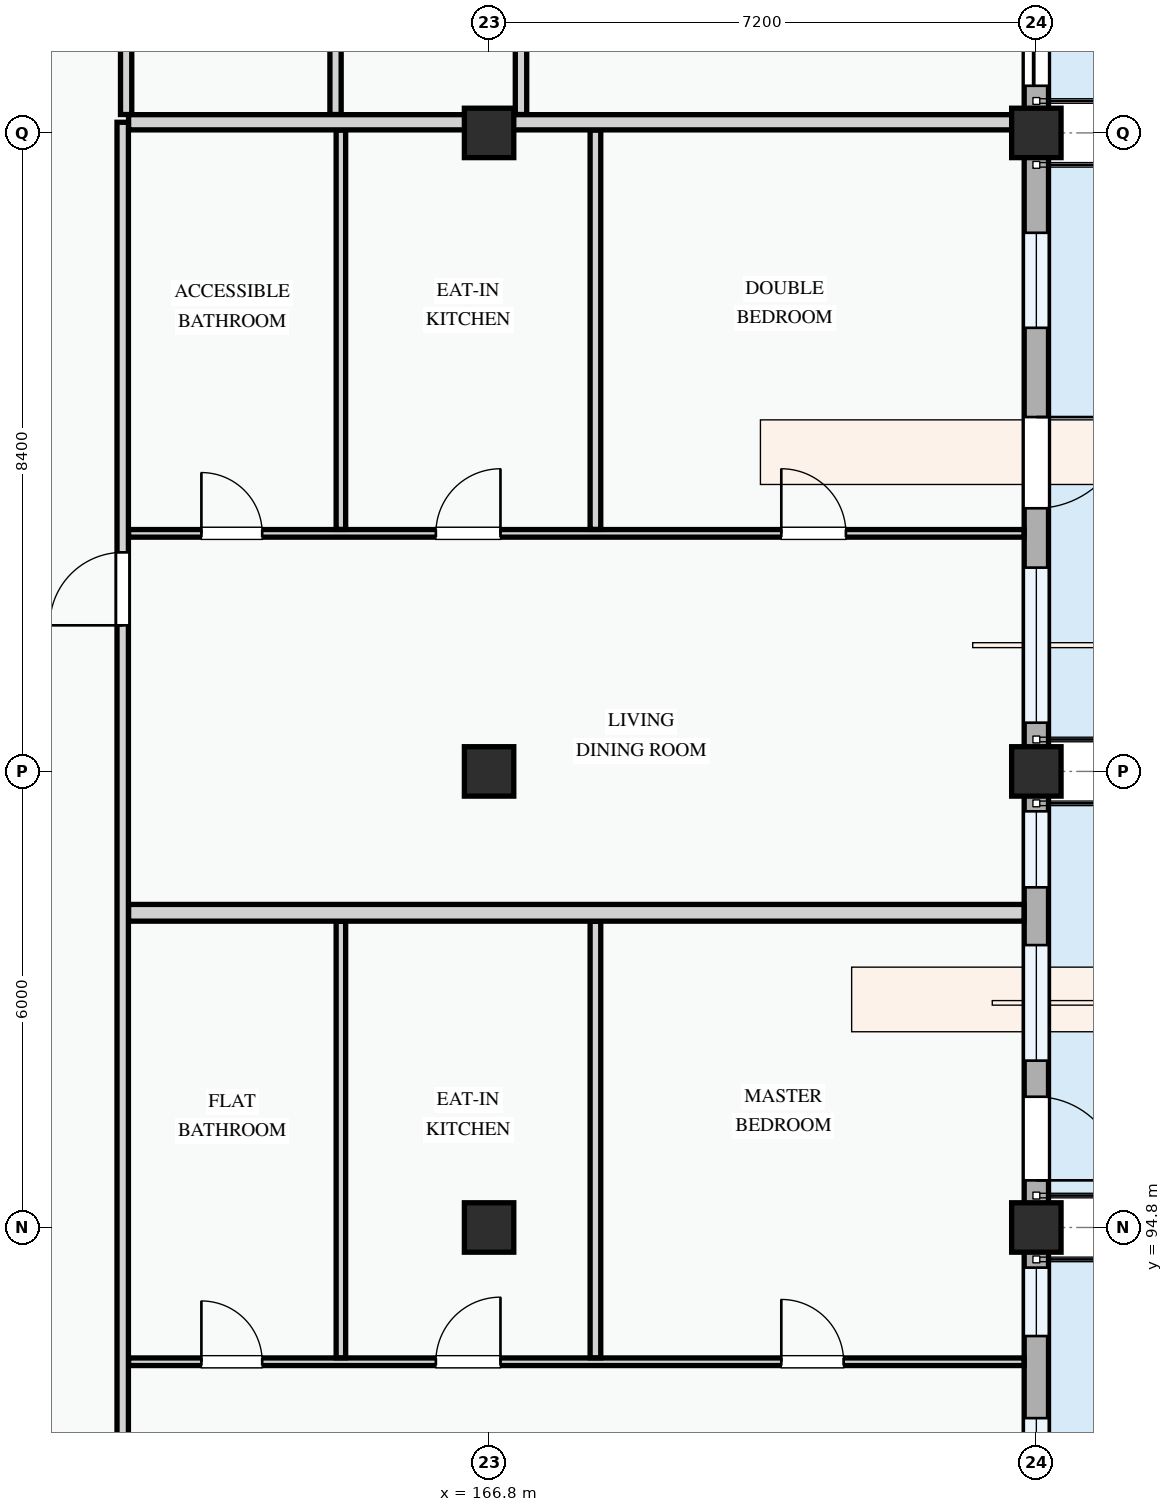
"""IFC4 building model, lengths in metres.
Left out: names, types, materials, properties, quantities, classifications, styles, units other than length and angle.
Written with IfcOpenShell. Run it as: python <this file> out.ifc"""

import sys

from ifc_helpers import new_model, si_unit, direction, frame, frame_2d, origin, origin_2d, place, context, subcontext, project, spatial, rectangle, extrude, element, fill, save


model = new_model("IFC4")
c1 = context("Model", 3, precision=1e-05, world=origin(), true_north=direction((0.0, 1.0)))
c2 = subcontext(c1, "Body", "Model", "MODEL_VIEW")
j1 = project(units=[si_unit("LENGTHUNIT", "METRE"), si_unit("PLANEANGLEUNIT", "RADIAN")], contexts=[c1])
p1 = place(None, origin())
s1 = spatial("IfcSite", under=j1, at=p1, CompositionType="ELEMENT")
p2 = place(p1, origin())
s2 = spatial("IfcBuilding", under=s1, at=p2, CompositionType="ELEMENT")
p3 = place(p2, frame((0.0, 0.0, 18.0)))
s3 = spatial("IfcBuildingStorey", under=s2, at=p3, CompositionType="ELEMENT", Elevation=18.0)
for number, where, z_axis, x_axis in (
    (1, (166.8, 94.8, 0.0), (0.0, 0.0, 1.0), (1.0, 0.0, 0.0)),
    (2, (166.8, 100.8, 0.0), (0.0, 0.0, 1.0), (1.0, 0.0, 0.0)),
    (3, (166.8, 109.2, 0.0), (0.0, 0.0, 1.0), (1.0, 0.0, 0.0)),
    (4, (174.0, 94.8, 0.0), (0.0, 0.0, 1.0), (1.0, 0.0, 0.0)),
    (5, (174.0, 100.8, 0.0), (0.0, 0.0, 1.0), (1.0, 0.0, 0.0)),
    (6, (174.0, 109.2, 0.0), (0.0, 0.0, 1.0), (1.0, 0.0, 0.0)),
):
    element("IfcColumn", number, at=place(p3, frame(where, z_axis=z_axis, x_axis=x_axis)), inside=s3, PredefinedType="COLUMN", context=c2, shape_type="SweptSolid", body=[
        extrude(rectangle(XDim=0.65, YDim=0.65, at=origin_2d()), origin(), (0.0, 0.0, 1.0), 3.3),
    ])
p4 = place(p3, frame((174.0, 109.2, 0.0), z_axis=(0.0, 0.0, 1.0), x_axis=(0.0, 1.0, 0.0)))
e7 = element("IfcWall", 7, at=p4, inside=s3, PredefinedType="STANDARD", context=c2, shape_type="SweptSolid", body=[
    extrude(rectangle(XDim=6.0, YDim=0.32, at=frame_2d((3.0, 0.0))), origin(), (0.0, 0.0, 1.0), 2.575),
])
p5 = place(p4, frame((0.62, 0.0, 0.0)))
e8 = element("IfcOpeningElement", 8, at=p5, cuts=e7, PredefinedType="OPENING", context=c2, shape_type="SweptSolid", body=[
    extrude(rectangle(XDim=1.4, YDim=2.2, at=frame_2d((0.7, 1.1))), frame((0.0, 0.17, 0.0), z_axis=(0.0, -1.0, 0.0), x_axis=(1.0, 0.0, 0.0)), (0.0, 0.0, 1.0), 0.34),
])
p6 = place(p4, frame((2.765, 0.0, 0.78)))
e9 = element("IfcOpeningElement", 9, at=p6, cuts=e7, PredefinedType="OPENING", context=c2, shape_type="SweptSolid", body=[
    extrude(rectangle(XDim=2.35, YDim=1.55, at=frame_2d((1.175, 0.775))), frame((0.0, 0.17, 0.0), z_axis=(0.0, -1.0, 0.0), x_axis=(1.0, 0.0, 0.0)), (0.0, 0.0, 1.0), 0.34),
])
p7 = place(p3, frame((174.0, 86.4, 0.0), z_axis=(0.0, 0.0, 1.0), x_axis=(0.0, 1.0, 0.0)))
e10 = element("IfcWall", 10, at=p7, inside=s3, PredefinedType="STANDARD", context=c2, shape_type="SweptSolid", body=[
    extrude(rectangle(XDim=8.4, YDim=0.32, at=frame_2d((4.2, 0.0))), origin(), (0.0, 0.0, 1.0), 2.425),
])
p8 = place(p7, frame((3.05, 0.0, 0.0)))
e11 = element("IfcOpeningElement", 11, at=p8, cuts=e10, PredefinedType="OPENING", context=c2, shape_type="SweptSolid", body=[
    extrude(rectangle(XDim=1.05, YDim=2.15, at=frame_2d((0.525, 1.075))), frame((0.0, 0.17, 0.0), z_axis=(0.0, -1.0, 0.0), x_axis=(1.0, 0.0, 0.0)), (0.0, 0.0, 1.0), 0.34),
])
p9 = place(p7, frame((0.805, 0.0, 0.78)))
e12 = element("IfcOpeningElement", 12, at=p9, cuts=e10, PredefinedType="OPENING", context=c2, shape_type="SweptSolid", body=[
    extrude(rectangle(XDim=1.3, YDim=1.4, at=frame_2d((0.65, 0.7))), frame((0.0, 0.17, 0.0), z_axis=(0.0, -1.0, 0.0), x_axis=(1.0, 0.0, 0.0)), (0.0, 0.0, 1.0), 0.34),
])
p10 = place(p7, frame((4.892, 0.0, 0.78)))
e13 = element("IfcOpeningElement", 13, at=p10, cuts=e10, PredefinedType="OPENING", context=c2, shape_type="SweptSolid", body=[
    extrude(rectangle(XDim=1.0, YDim=1.25, at=frame_2d((0.5, 0.625))), frame((0.0, 0.17, 0.0), z_axis=(0.0, -1.0, 0.0), x_axis=(1.0, 0.0, 0.0)), (0.0, 0.0, 1.0), 0.34),
])
p11 = place(p7, frame((6.972, 0.0, 0.78)))
e14 = element("IfcOpeningElement", 14, at=p11, cuts=e10, PredefinedType="OPENING", context=c2, shape_type="SweptSolid", body=[
    extrude(rectangle(XDim=0.9, YDim=1.2, at=frame_2d((0.45, 0.6))), frame((0.0, 0.17, 0.0), z_axis=(0.0, -1.0, 0.0), x_axis=(1.0, 0.0, 0.0)), (0.0, 0.0, 1.0), 0.34),
])
p12 = place(p3, frame((174.0, 94.8, 0.0), z_axis=(0.0, 0.0, 1.0), x_axis=(0.0, 1.0, 0.0)))
e15 = element("IfcWall", 15, at=p12, inside=s3, PredefinedType="STANDARD", context=c2, shape_type="SweptSolid", body=[
    extrude(rectangle(XDim=6.0, YDim=0.32, at=frame_2d((3.0, 0.0))), origin(), (0.0, 0.0, 1.0), 2.575),
])
p13 = place(p12, frame((0.62, 0.0, 0.0)))
e16 = element("IfcOpeningElement", 16, at=p13, cuts=e15, PredefinedType="OPENING", context=c2, shape_type="SweptSolid", body=[
    extrude(rectangle(XDim=1.1, YDim=2.15, at=frame_2d((0.55, 1.075))), frame((0.0, 0.17, 0.0), z_axis=(0.0, -1.0, 0.0), x_axis=(1.0, 0.0, 0.0)), (0.0, 0.0, 1.0), 0.34),
])
p14 = place(p12, frame((2.195, 0.0, 0.78)))
e17 = element("IfcOpeningElement", 17, at=p14, cuts=e15, PredefinedType="OPENING", context=c2, shape_type="SweptSolid", body=[
    extrude(rectangle(XDim=1.52, YDim=1.42, at=frame_2d((0.76, 0.71))), frame((0.0, 0.17, 0.0), z_axis=(0.0, -1.0, 0.0), x_axis=(1.0, 0.0, 0.0)), (0.0, 0.0, 1.0), 0.34),
])
p15 = place(p12, frame((4.475, 0.0, 0.78)))
e18 = element("IfcOpeningElement", 18, at=p15, cuts=e15, PredefinedType="OPENING", context=c2, shape_type="SweptSolid", body=[
    extrude(rectangle(XDim=1.0, YDim=1.25, at=frame_2d((0.5, 0.625))), frame((0.0, 0.17, 0.0), z_axis=(0.0, -1.0, 0.0), x_axis=(1.0, 0.0, 0.0)), (0.0, 0.0, 1.0), 0.34),
])
p16 = place(p3, frame((174.0, 100.8, 0.0), z_axis=(0.0, 0.0, 1.0), x_axis=(0.0, 1.0, 0.0)))
e19 = element("IfcWall", 19, at=p16, inside=s3, PredefinedType="STANDARD", context=c2, shape_type="SweptSolid", body=[
    extrude(rectangle(XDim=8.4, YDim=0.32, at=frame_2d((4.2, 0.0))), origin(), (0.0, 0.0, 1.0), 2.425),
])
p17 = place(p16, frame((3.462, 0.0, 0.0)))
e20 = element("IfcOpeningElement", 20, at=p17, cuts=e19, PredefinedType="OPENING", context=c2, shape_type="SweptSolid", body=[
    extrude(rectangle(XDim=1.2, YDim=2.15, at=frame_2d((0.6, 1.075))), frame((0.0, 0.17, 0.0), z_axis=(0.0, -1.0, 0.0), x_axis=(1.0, 0.0, 0.0)), (0.0, 0.0, 1.0), 0.34),
])
p18 = place(p16, frame((0.641, 0.0, 0.78)))
e21 = element("IfcOpeningElement", 21, at=p18, cuts=e19, PredefinedType="OPENING", context=c2, shape_type="SweptSolid", body=[
    extrude(rectangle(XDim=2.04, YDim=1.46, at=frame_2d((1.02, 0.73))), frame((0.0, 0.17, 0.0), z_axis=(0.0, -1.0, 0.0), x_axis=(1.0, 0.0, 0.0)), (0.0, 0.0, 1.0), 0.34),
])
p19 = place(p16, frame((5.836, 0.0, 0.78)))
e22 = element("IfcOpeningElement", 22, at=p19, cuts=e19, PredefinedType="OPENING", context=c2, shape_type="SweptSolid", body=[
    extrude(rectangle(XDim=1.25, YDim=1.45, at=frame_2d((0.625, 0.725))), frame((0.0, 0.17, 0.0), z_axis=(0.0, -1.0, 0.0), x_axis=(1.0, 0.0, 0.0)), (0.0, 0.0, 1.0), 0.34),
])
for number, where, z_axis, x_axis in (
    (23, (162.025, 113.324, 0.0), (0.0, 0.0, 1.0), (0.0, -1.0, 0.0)),
    (24, (164.78, 113.324, 0.0), (0.0, 0.0, 1.0), (0.0, -1.0, 0.0)),
):
    element("IfcWall", number, at=place(p3, frame(where, z_axis=z_axis, x_axis=x_axis)), inside=s3, PredefinedType="PARTITIONING", context=c2, shape_type="SweptSolid", body=[
        extrude(rectangle(XDim=3.882, YDim=0.148, at=frame_2d((1.941, 0.0))), origin(), (0.0, 0.0, 1.0), 3.0),
    ])
p20 = place(p3, frame((167.22, 109.442, 0.0), z_axis=(0.0, 0.0, 1.0), x_axis=(0.0, 1.0, 0.0)))
e25 = element("IfcWall", 25, at=p20, inside=s3, PredefinedType="PARTITIONING", context=c2, shape_type="SweptSolid", body=[
    extrude(rectangle(XDim=14.018, YDim=0.15, at=frame_2d((7.009, 0.0))), origin(), (0.0, 0.0, 1.0), 2.425),
])
p21 = place(p20, frame((2.448, 0.0, 0.0)))
e26 = element("IfcOpeningElement", 26, at=p21, cuts=e25, PredefinedType="OPENING", context=c2, shape_type="SweptSolid", body=[
    extrude(rectangle(XDim=0.92, YDim=2.1, at=frame_2d((0.46, 1.05))), frame((0.0, 0.085, 0.0), z_axis=(0.0, -1.0, 0.0), x_axis=(1.0, 0.0, 0.0)), (0.0, 0.0, 1.0), 0.17),
])
p22 = place(p3, frame((162.057, 93.034, 0.0), z_axis=(0.0, 0.0, 1.0), x_axis=(1.0, 0.0, 0.0)))
e27 = element("IfcWall", 27, at=p22, inside=s3, PredefinedType="PARTITIONING", context=c2, shape_type="SweptSolid", body=[
    extrude(rectangle(XDim=11.781, YDim=0.1, at=frame_2d((5.891, 0.0))), origin(), (0.0, 0.0, 1.0), 3.0),
])
p23 = place(p22, frame((0.958, 0.0, 0.0)))
e28 = element("IfcOpeningElement", 28, at=p23, cuts=e27, PredefinedType="OPENING", context=c2, shape_type="SweptSolid", body=[
    extrude(rectangle(XDim=0.8, YDim=2.1, at=frame_2d((0.4, 1.05))), frame((0.0, 0.06, 0.0), z_axis=(0.0, -1.0, 0.0), x_axis=(1.0, 0.0, 0.0)), (0.0, 0.0, 1.0), 0.12),
])
p24 = place(p22, frame((4.043, 0.0, 0.0)))
e29 = element("IfcOpeningElement", 29, at=p24, cuts=e27, PredefinedType="OPENING", context=c2, shape_type="SweptSolid", body=[
    extrude(rectangle(XDim=0.85, YDim=2.1, at=frame_2d((0.425, 1.05))), frame((0.0, 0.06, 0.0), z_axis=(0.0, -1.0, 0.0), x_axis=(1.0, 0.0, 0.0)), (0.0, 0.0, 1.0), 0.12),
])
p25 = place(p22, frame((8.588, 0.0, 0.0)))
e30 = element("IfcOpeningElement", 30, at=p25, cuts=e27, PredefinedType="OPENING", context=c2, shape_type="SweptSolid", body=[
    extrude(rectangle(XDim=0.82, YDim=2.08, at=frame_2d((0.41, 1.04))), frame((0.0, 0.06, 0.0), z_axis=(0.0, -1.0, 0.0), x_axis=(1.0, 0.0, 0.0)), (0.0, 0.0, 1.0), 0.12),
])
p26 = place(p3, frame((168.199, 93.086, 0.0), z_axis=(0.0, 0.0, 1.0), x_axis=(0.0, 1.0, 0.0)))
e31 = element("IfcWall", 31, at=p26, inside=s3, PredefinedType="PARTITIONING", context=c2, shape_type="SweptSolid", body=[
    extrude(rectangle(XDim=5.742, YDim=0.14, at=frame_2d((2.871, 0.0))), origin(), (0.0, 0.0, 1.0), 3.0),
])
p27 = place(p3, frame((164.85, 93.086, 0.0), z_axis=(0.0, 0.0, 1.0), x_axis=(0.0, 1.0, 0.0)))
e32 = element("IfcWall", 32, at=p27, inside=s3, PredefinedType="PARTITIONING", context=c2, shape_type="SweptSolid", body=[
    extrude(rectangle(XDim=5.742, YDim=0.125, at=frame_2d((2.871, 0.0))), origin(), (0.0, 0.0, 1.0), 3.0),
])
p28 = place(p3, frame((162.057, 103.932, 0.0), z_axis=(0.0, 0.0, 1.0), x_axis=(1.0, 0.0, 0.0)))
e33 = element("IfcWall", 33, at=p28, inside=s3, PredefinedType="PARTITIONING", context=c2, shape_type="SweptSolid", body=[
    extrude(rectangle(XDim=11.781, YDim=0.1, at=frame_2d((5.891, 0.0))), origin(), (0.0, 0.0, 1.0), 3.0),
])
p29 = place(p28, frame((0.958, 0.0, 0.0)))
e34 = element("IfcOpeningElement", 34, at=p29, cuts=e33, PredefinedType="OPENING", context=c2, shape_type="SweptSolid", body=[
    extrude(rectangle(XDim=0.8, YDim=2.1, at=frame_2d((0.4, 1.05))), frame((0.0, 0.06, 0.0), z_axis=(0.0, -1.0, 0.0), x_axis=(1.0, 0.0, 0.0)), (0.0, 0.0, 1.0), 0.12),
])
p30 = place(p28, frame((4.043, 0.0, 0.0)))
e35 = element("IfcOpeningElement", 35, at=p30, cuts=e33, PredefinedType="OPENING", context=c2, shape_type="SweptSolid", body=[
    extrude(rectangle(XDim=0.85, YDim=2.1, at=frame_2d((0.425, 1.05))), frame((0.0, 0.06, 0.0), z_axis=(0.0, -1.0, 0.0), x_axis=(1.0, 0.0, 0.0)), (0.0, 0.0, 1.0), 0.12),
])
p31 = place(p28, frame((8.588, 0.0, 0.0)))
e36 = element("IfcOpeningElement", 36, at=p31, cuts=e33, PredefinedType="OPENING", context=c2, shape_type="SweptSolid", body=[
    extrude(rectangle(XDim=0.85, YDim=2.1, at=frame_2d((0.425, 1.05))), frame((0.0, 0.06, 0.0), z_axis=(0.0, -1.0, 0.0), x_axis=(1.0, 0.0, 0.0)), (0.0, 0.0, 1.0), 0.12),
])
p32 = place(p3, frame((168.199, 103.984, 0.0), z_axis=(0.0, 0.0, 1.0), x_axis=(0.0, 1.0, 0.0)))
e37 = element("IfcWall", 37, at=p32, inside=s3, PredefinedType="PARTITIONING", context=c2, shape_type="SweptSolid", body=[
    extrude(rectangle(XDim=5.254, YDim=0.14, at=frame_2d((2.627, 0.0))), origin(), (0.0, 0.0, 1.0), 3.0),
])
p33 = place(p3, frame((164.85, 103.984, 0.0), z_axis=(0.0, 0.0, 1.0), x_axis=(0.0, 1.0, 0.0)))
e38 = element("IfcWall", 38, at=p33, inside=s3, PredefinedType="PARTITIONING", context=c2, shape_type="SweptSolid", body=[
    extrude(rectangle(XDim=5.254, YDim=0.125, at=frame_2d((2.627, 0.0))), origin(), (0.0, 0.0, 1.0), 3.0),
])
p34 = place(p3, frame((162.057, 98.94, 0.0), z_axis=(0.0, 0.0, 1.0), x_axis=(1.0, 0.0, 0.0)))
e39 = element("IfcWall", 39, at=p34, inside=s3, PredefinedType="PARTITIONING", context=c2, shape_type="SweptSolid", body=[
    extrude(rectangle(XDim=11.781, YDim=0.22, at=frame_2d((5.891, 0.0))), origin(), (0.0, 0.0, 1.0), 3.0),
])
p35 = place(p3, frame((162.057, 109.34, 0.0), z_axis=(0.0, 0.0, 1.0), x_axis=(1.0, 0.0, 0.0)))
e40 = element("IfcWall", 40, at=p35, inside=s3, PredefinedType="PARTITIONING", context=c2, shape_type="SweptSolid", body=[
    extrude(rectangle(XDim=11.781, YDim=0.2, at=frame_2d((5.891, 0.0))), origin(), (0.0, 0.0, 1.0), 2.375),
])
p36 = place(p3, frame((161.98, 80.46, 0.0), z_axis=(0.0, 0.0, 1.0), x_axis=(0.0, 1.0, 0.0)))
e41 = element("IfcWall", 41, at=p36, inside=s3, PredefinedType="PARTITIONING", context=c2, shape_type="SweptSolid", body=[
    extrude(rectangle(XDim=28.88, YDim=0.15, at=frame_2d((14.44, 0.0))), origin(), (0.0, 0.0, 1.0), 3.0),
])
p37 = place(p36, frame((2.441, 0.0, 0.0)))
e42 = element("IfcOpeningElement", 42, at=p37, cuts=e41, PredefinedType="OPENING", context=c2, shape_type="SweptSolid", body=[
    extrude(rectangle(XDim=0.92, YDim=2.1, at=frame_2d((0.46, 1.05))), frame((0.0, 0.085, 0.0), z_axis=(0.0, -1.0, 0.0), x_axis=(1.0, 0.0, 0.0)), (0.0, 0.0, 1.0), 0.17),
])
p38 = place(p36, frame((9.677, 0.0, 0.0)))
e43 = element("IfcOpeningElement", 43, at=p38, cuts=e41, PredefinedType="OPENING", context=c2, shape_type="SweptSolid", body=[
    extrude(rectangle(XDim=0.92, YDim=2.1, at=frame_2d((0.46, 1.05))), frame((0.0, 0.085, 0.0), z_axis=(0.0, -1.0, 0.0), x_axis=(1.0, 0.0, 0.0)), (0.0, 0.0, 1.0), 0.17),
])
p39 = place(p36, frame((22.262, 0.0, 0.0)))
e44 = element("IfcOpeningElement", 44, at=p39, cuts=e41, PredefinedType="OPENING", context=c2, shape_type="SweptSolid", body=[
    extrude(rectangle(XDim=0.96, YDim=2.12, at=frame_2d((0.48, 1.06))), frame((0.0, 0.085, 0.0), z_axis=(0.0, -1.0, 0.0), x_axis=(1.0, 0.0, 0.0)), (0.0, 0.0, 1.0), 0.17),
])
p40 = place(p5, frame((1.4, 0.0, 0.0), z_axis=(0.0, 0.0, 1.0), x_axis=(-1.0, 0.0, 0.0)))
e45 = element("IfcDoor", 45, at=p40, inside=s3, OperationType="SLIDING_TO_LEFT", PredefinedType="DOOR", context=c2, shape_type="SweptSolid", body=[
    extrude(rectangle(XDim=1.4, YDim=2.2, at=frame_2d((0.7, 1.1))), frame((0.0, 0.025, 0.0), z_axis=(0.0, -1.0, 0.0), x_axis=(1.0, 0.0, 0.0)), (0.0, 0.0, 1.0), 0.05),
])
fill(e8, e45)
p41 = place(p10, origin())
e46 = element("IfcWindow", 46, at=p41, inside=s3, PartitioningType="SINGLE_PANEL", PredefinedType="WINDOW", context=c2, shape_type="SweptSolid", body=[
    extrude(rectangle(XDim=1.0, YDim=1.25, at=frame_2d((0.5, 0.625))), frame((0.0, 0.03, 0.0), z_axis=(0.0, -1.0, 0.0), x_axis=(1.0, 0.0, 0.0)), (0.0, 0.0, 1.0), 0.06),
])
fill(e13, e46)
p42 = place(p11, origin())
e47 = element("IfcWindow", 47, at=p42, inside=s3, PartitioningType="SINGLE_PANEL", PredefinedType="WINDOW", context=c2, shape_type="SweptSolid", body=[
    extrude(rectangle(XDim=0.9, YDim=1.2, at=frame_2d((0.45, 0.6))), frame((0.0, 0.03, 0.0), z_axis=(0.0, -1.0, 0.0), x_axis=(1.0, 0.0, 0.0)), (0.0, 0.0, 1.0), 0.06),
])
fill(e14, e47)
p43 = place(p13, frame((1.1, 0.0, 0.0), z_axis=(0.0, 0.0, 1.0), x_axis=(-1.0, 0.0, 0.0)))
e48 = element("IfcDoor", 48, at=p43, inside=s3, OperationType="SINGLE_SWING_RIGHT", PredefinedType="DOOR", context=c2, shape_type="SweptSolid", body=[
    extrude(rectangle(XDim=1.1, YDim=2.15, at=frame_2d((0.55, 1.075))), frame((0.0, 0.025, 0.0), z_axis=(0.0, -1.0, 0.0), x_axis=(1.0, 0.0, 0.0)), (0.0, 0.0, 1.0), 0.05),
])
fill(e16, e48)
p44 = place(p14, origin())
e49 = element("IfcWindow", 49, at=p44, inside=s3, PartitioningType="SINGLE_PANEL", PredefinedType="WINDOW", context=c2, shape_type="SweptSolid", body=[
    extrude(rectangle(XDim=1.52, YDim=1.42, at=frame_2d((0.76, 0.71))), frame((0.0, 0.03, 0.0), z_axis=(0.0, -1.0, 0.0), x_axis=(1.0, 0.0, 0.0)), (0.0, 0.0, 1.0), 0.06),
])
fill(e17, e49)
p45 = place(p15, origin())
e50 = element("IfcWindow", 50, at=p45, inside=s3, PartitioningType="SINGLE_PANEL", PredefinedType="WINDOW", context=c2, shape_type="SweptSolid", body=[
    extrude(rectangle(XDim=1.0, YDim=1.25, at=frame_2d((0.5, 0.625))), frame((0.0, 0.03, 0.0), z_axis=(0.0, -1.0, 0.0), x_axis=(1.0, 0.0, 0.0)), (0.0, 0.0, 1.0), 0.06),
])
fill(e18, e50)
p46 = place(p17, frame((1.2, 0.0, 0.0), z_axis=(0.0, 0.0, 1.0), x_axis=(-1.0, 0.0, 0.0)))
e51 = element("IfcDoor", 51, at=p46, inside=s3, OperationType="SINGLE_SWING_LEFT", PredefinedType="DOOR", context=c2, shape_type="SweptSolid", body=[
    extrude(rectangle(XDim=1.2, YDim=2.15, at=frame_2d((0.6, 1.075))), frame((0.0, 0.025, 0.0), z_axis=(0.0, -1.0, 0.0), x_axis=(1.0, 0.0, 0.0)), (0.0, 0.0, 1.0), 0.05),
])
fill(e20, e51)
p47 = place(p18, origin())
e52 = element("IfcWindow", 52, at=p47, inside=s3, PartitioningType="DOUBLE_PANEL_VERTICAL", PredefinedType="WINDOW", context=c2, shape_type="SweptSolid", body=[
    extrude(rectangle(XDim=2.04, YDim=1.46, at=frame_2d((1.02, 0.73))), frame((0.0, 0.03, 0.0), z_axis=(0.0, -1.0, 0.0), x_axis=(1.0, 0.0, 0.0)), (0.0, 0.0, 1.0), 0.06),
])
fill(e21, e52)
p48 = place(p19, origin())
e53 = element("IfcWindow", 53, at=p48, inside=s3, PartitioningType="SINGLE_PANEL", PredefinedType="WINDOW", context=c2, shape_type="SweptSolid", body=[
    extrude(rectangle(XDim=1.25, YDim=1.45, at=frame_2d((0.625, 0.725))), frame((0.0, 0.03, 0.0), z_axis=(0.0, -1.0, 0.0), x_axis=(1.0, 0.0, 0.0)), (0.0, 0.0, 1.0), 0.06),
])
fill(e22, e53)
p49 = place(p23, origin())
e54 = element("IfcDoor", 54, at=p49, inside=s3, OperationType="SINGLE_SWING_LEFT", PredefinedType="DOOR", context=c2, shape_type="SweptSolid", body=[
    extrude(rectangle(XDim=0.8, YDim=2.1, at=frame_2d((0.4, 1.05))), frame((0.0, 0.025, 0.0), z_axis=(0.0, -1.0, 0.0), x_axis=(1.0, 0.0, 0.0)), (0.0, 0.0, 1.0), 0.05),
])
fill(e28, e54)
p50 = place(p24, origin())
e55 = element("IfcDoor", 55, at=p50, inside=s3, OperationType="SINGLE_SWING_RIGHT", PredefinedType="DOOR", context=c2, shape_type="SweptSolid", body=[
    extrude(rectangle(XDim=0.85, YDim=2.1, at=frame_2d((0.425, 1.05))), frame((0.0, 0.025, 0.0), z_axis=(0.0, -1.0, 0.0), x_axis=(1.0, 0.0, 0.0)), (0.0, 0.0, 1.0), 0.05),
])
fill(e29, e55)
p51 = place(p25, origin())
e56 = element("IfcDoor", 56, at=p51, inside=s3, OperationType="SINGLE_SWING_LEFT", PredefinedType="DOOR", context=c2, shape_type="SweptSolid", body=[
    extrude(rectangle(XDim=0.82, YDim=2.08, at=frame_2d((0.41, 1.04))), frame((0.0, 0.025, 0.0), z_axis=(0.0, -1.0, 0.0), x_axis=(1.0, 0.0, 0.0)), (0.0, 0.0, 1.0), 0.05),
])
fill(e30, e56)
p52 = place(p29, origin())
e57 = element("IfcDoor", 57, at=p52, inside=s3, OperationType="SINGLE_SWING_LEFT", PredefinedType="DOOR", context=c2, shape_type="SweptSolid", body=[
    extrude(rectangle(XDim=0.8, YDim=2.1, at=frame_2d((0.4, 1.05))), frame((0.0, 0.025, 0.0), z_axis=(0.0, -1.0, 0.0), x_axis=(1.0, 0.0, 0.0)), (0.0, 0.0, 1.0), 0.05),
])
fill(e34, e57)
p53 = place(p30, origin())
e58 = element("IfcDoor", 58, at=p53, inside=s3, OperationType="SINGLE_SWING_RIGHT", PredefinedType="DOOR", context=c2, shape_type="SweptSolid", body=[
    extrude(rectangle(XDim=0.85, YDim=2.1, at=frame_2d((0.425, 1.05))), frame((0.0, 0.025, 0.0), z_axis=(0.0, -1.0, 0.0), x_axis=(1.0, 0.0, 0.0)), (0.0, 0.0, 1.0), 0.05),
])
fill(e35, e58)
p54 = place(p31, origin())
e59 = element("IfcDoor", 59, at=p54, inside=s3, OperationType="SINGLE_SWING_LEFT", PredefinedType="DOOR", context=c2, shape_type="SweptSolid", body=[
    extrude(rectangle(XDim=0.85, YDim=2.1, at=frame_2d((0.425, 1.05))), frame((0.0, 0.025, 0.0), z_axis=(0.0, -1.0, 0.0), x_axis=(1.0, 0.0, 0.0)), (0.0, 0.0, 1.0), 0.05),
])
fill(e36, e59)
p55 = place(p39, origin())
e60 = element("IfcDoor", 60, at=p55, inside=s3, OperationType="SINGLE_SWING_LEFT", PredefinedType="DOOR", context=c2, shape_type="SweptSolid", body=[
    extrude(rectangle(XDim=0.96, YDim=2.12, at=frame_2d((0.48, 1.06))), frame((0.0, 0.025, 0.0), z_axis=(0.0, -1.0, 0.0), x_axis=(1.0, 0.0, 0.0)), (0.0, 0.0, 1.0), 0.05),
])
fill(e44, e60)
save(model, sys.argv[1])
